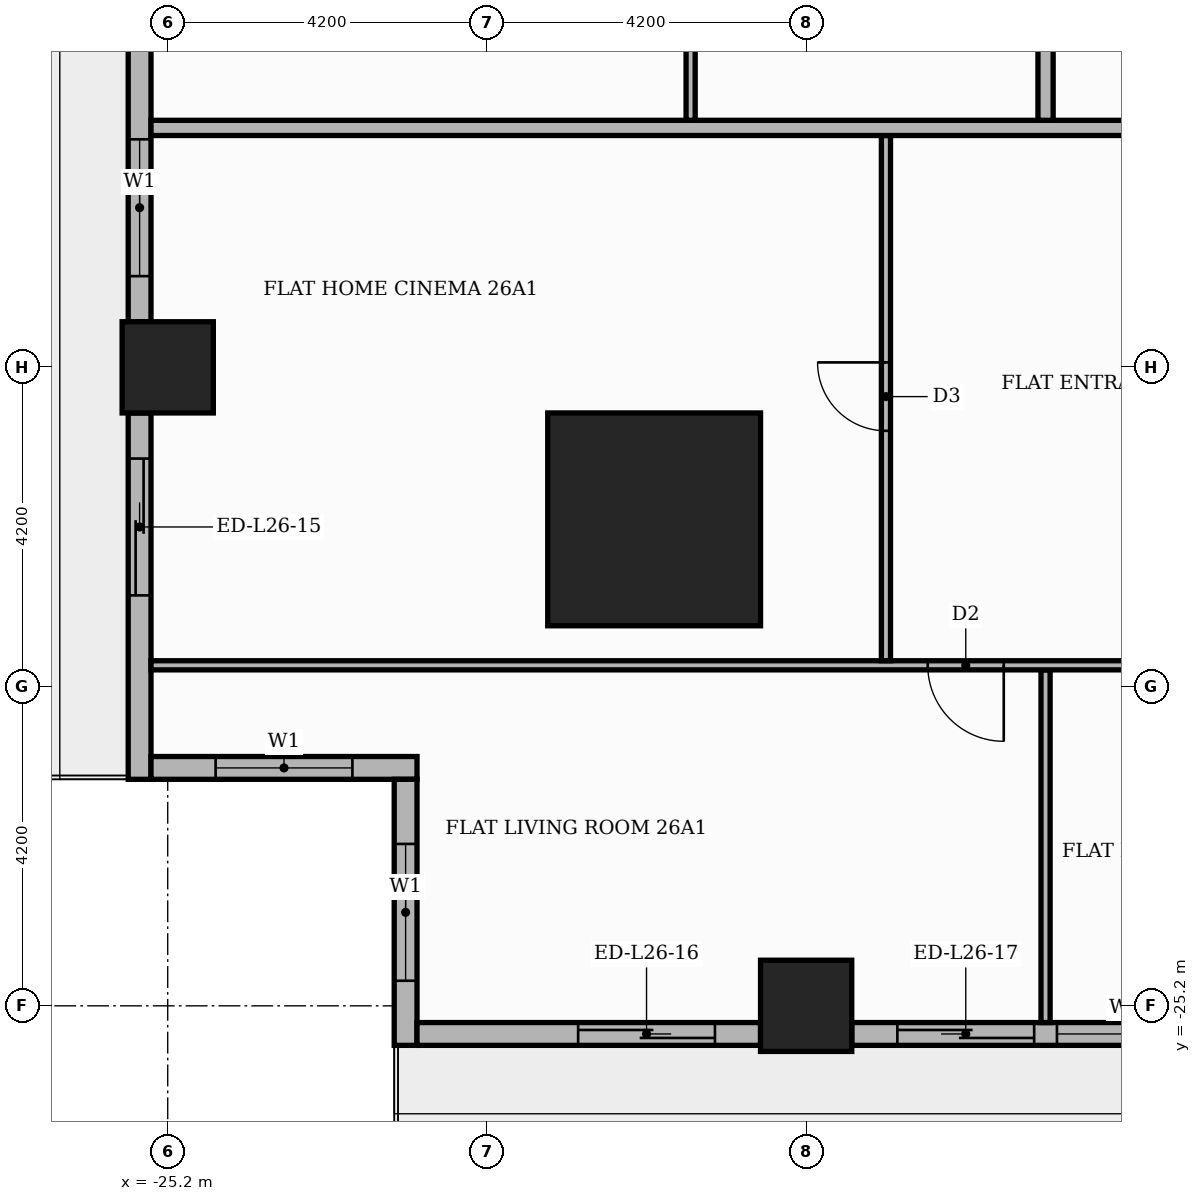
"""IFC4 building model, lengths in metres.
Left out: names, types, materials, properties, quantities, classifications, styles, units other than length and angle.
Written with IfcOpenShell. Run it as: python <this file> out.ifc"""

import sys

from ifc_helpers import new_model, si_unit, direction, frame, frame_2d, origin, origin_2d, place, context, subcontext, project, spatial, rectangle, extrude, element, fill, save


model = new_model("IFC4")
c1 = context("Model", 3, precision=1e-05, world=origin(), true_north=direction((0.0, 1.0)))
c2 = subcontext(c1, "Body", "Model", "MODEL_VIEW")
j1 = project(units=[si_unit("LENGTHUNIT", "METRE"), si_unit("PLANEANGLEUNIT", "RADIAN")], contexts=[c1])
p1 = place(None, origin())
s1 = spatial("IfcSite", under=j1, at=p1, CompositionType="ELEMENT")
p2 = place(p1, origin())
s2 = spatial("IfcBuilding", under=s1, at=p2, CompositionType="ELEMENT")
p3 = place(p2, frame((0.0, 0.0, 110.4)))
s3 = spatial("IfcBuildingStorey", under=s2, at=p3, CompositionType="ELEMENT", Elevation=110.4)
p4 = place(p3, frame((-18.8, -18.8, 0.0), z_axis=(0.0, 0.0, 1.0), x_axis=(1.0, 0.0, 0.0)))
e1 = element("IfcColumn", 1, at=p4, inside=s3, PredefinedType="COLUMN", context=c2, shape_type="SweptSolid", body=[
    extrude(rectangle(XDim=2.8, YDim=2.8, at=origin_2d()), origin(), (0.0, 0.0, 1.0), 3.9),
])
for number, where, z_axis, x_axis in (
    (2, (-16.8, -25.2, 0.0), (0.0, 0.0, 1.0), (1.0, 0.0, 0.0)),
    (3, (-25.2, -16.8, 0.0), (0.0, 0.0, 1.0), (1.0, 0.0, 0.0)),
):
    element("IfcColumn", number, at=place(p3, frame(where, z_axis=z_axis, x_axis=x_axis)), inside=s3, PredefinedType="COLUMN", context=c2, shape_type="SweptSolid", body=[
        extrude(rectangle(XDim=1.2, YDim=1.2, at=origin_2d()), origin(), (0.0, 0.0, 1.0), 3.9),
    ])
p5 = place(p3, frame((-25.57, -11.85, 0.0), z_axis=(0.0, 0.0, 1.0), x_axis=(0.0, -1.0, 0.0)))
e4 = element("IfcWall", 4, at=p5, inside=s3, PredefinedType="STANDARD", context=c2, shape_type="SweptSolid", body=[
    extrude(rectangle(XDim=4.35, YDim=0.3, at=frame_2d((2.175, 0.0))), origin(), (0.0, 0.0, 1.0), 3.48),
])
p6 = place(p5, frame((1.95, 0.0, 0.9)))
e5 = element("IfcOpeningElement", 5, at=p6, cuts=e4, PredefinedType="OPENING", context=c2, shape_type="SweptSolid", body=[
    extrude(rectangle(XDim=1.8, YDim=2.1, at=frame_2d((0.9, 1.05))), frame((0.0, 0.16, 0.0), z_axis=(0.0, -1.0, 0.0), x_axis=(1.0, 0.0, 0.0)), (0.0, 0.0, 1.0), 0.32),
])
p7 = place(p3, frame((-25.57, -17.4, 0.0), z_axis=(0.0, 0.0, 1.0), x_axis=(0.0, -1.0, 0.0)))
e6 = element("IfcWall", 6, at=p7, inside=s3, PredefinedType="STANDARD", context=c2, shape_type="SweptSolid", body=[
    extrude(rectangle(XDim=4.82, YDim=0.3, at=frame_2d((2.41, 0.0))), origin(), (0.0, 0.0, 1.0), 3.48),
])
p8 = place(p7, frame((0.6, 0.0, 0.0)))
e7 = element("IfcOpeningElement", 7, at=p8, cuts=e6, PredefinedType="OPENING", context=c2, shape_type="SweptSolid", body=[
    extrude(rectangle(XDim=1.8, YDim=2.4, at=frame_2d((0.9, 1.2))), frame((0.0, 0.16, 0.0), z_axis=(0.0, -1.0, 0.0), x_axis=(1.0, 0.0, 0.0)), (0.0, 0.0, 1.0), 0.32),
])
p9 = place(p3, frame((-25.42, -22.07, 0.0), z_axis=(0.0, 0.0, 1.0), x_axis=(1.0, 0.0, 0.0)))
e8 = element("IfcWall", 8, at=p9, inside=s3, PredefinedType="STANDARD", context=c2, shape_type="SweptSolid", body=[
    extrude(rectangle(XDim=3.5, YDim=0.3, at=frame_2d((1.75, 0.0))), origin(), (0.0, 0.0, 1.0), 3.48),
])
p10 = place(p9, frame((0.85, 0.0, 0.9)))
e9 = element("IfcOpeningElement", 9, at=p10, cuts=e8, PredefinedType="OPENING", context=c2, shape_type="SweptSolid", body=[
    extrude(rectangle(XDim=1.8, YDim=2.1, at=frame_2d((0.9, 1.05))), frame((0.0, 0.16, 0.0), z_axis=(0.0, -1.0, 0.0), x_axis=(1.0, 0.0, 0.0)), (0.0, 0.0, 1.0), 0.32),
])
p11 = place(p3, frame((-22.07, -22.22, 0.0), z_axis=(0.0, 0.0, 1.0), x_axis=(0.0, -1.0, 0.0)))
e10 = element("IfcWall", 10, at=p11, inside=s3, PredefinedType="STANDARD", context=c2, shape_type="SweptSolid", body=[
    extrude(rectangle(XDim=3.5, YDim=0.3, at=frame_2d((1.75, 0.0))), origin(), (0.0, 0.0, 1.0), 3.48),
])
p12 = place(p11, frame((0.85, 0.0, 0.9)))
e11 = element("IfcOpeningElement", 11, at=p12, cuts=e10, PredefinedType="OPENING", context=c2, shape_type="SweptSolid", body=[
    extrude(rectangle(XDim=1.8, YDim=2.1, at=frame_2d((0.9, 1.05))), frame((0.0, 0.16, 0.0), z_axis=(0.0, -1.0, 0.0), x_axis=(1.0, 0.0, 0.0)), (0.0, 0.0, 1.0), 0.32),
])
p13 = place(p3, frame((-21.92, -25.57, 0.0), z_axis=(0.0, 0.0, 1.0), x_axis=(1.0, 0.0, 0.0)))
e12 = element("IfcWall", 12, at=p13, inside=s3, PredefinedType="STANDARD", context=c2, shape_type="SweptSolid", body=[
    extrude(rectangle(XDim=4.52, YDim=0.3, at=frame_2d((2.26, 0.0))), origin(), (0.0, 0.0, 1.0), 3.48),
])
p14 = place(p13, frame((2.12, 0.0, 0.0)))
e13 = element("IfcOpeningElement", 13, at=p14, cuts=e12, PredefinedType="OPENING", context=c2, shape_type="SweptSolid", body=[
    extrude(rectangle(XDim=1.8, YDim=2.4, at=frame_2d((0.9, 1.2))), frame((0.0, 0.16, 0.0), z_axis=(0.0, -1.0, 0.0), x_axis=(1.0, 0.0, 0.0)), (0.0, 0.0, 1.0), 0.32),
])
p15 = place(p3, frame((-16.2, -25.57, 0.0), z_axis=(0.0, 0.0, 1.0), x_axis=(1.0, 0.0, 0.0)))
e14 = element("IfcWall", 14, at=p15, inside=s3, PredefinedType="STANDARD", context=c2, shape_type="SweptSolid", body=[
    extrude(rectangle(XDim=7.2, YDim=0.3, at=frame_2d((3.6, 0.0))), origin(), (0.0, 0.0, 1.0), 3.48),
])
p16 = place(p15, frame((0.6, 0.0, 0.0)))
e15 = element("IfcOpeningElement", 15, at=p16, cuts=e14, PredefinedType="OPENING", context=c2, shape_type="SweptSolid", body=[
    extrude(rectangle(XDim=1.8, YDim=2.4, at=frame_2d((0.9, 1.2))), frame((0.0, 0.16, 0.0), z_axis=(0.0, -1.0, 0.0), x_axis=(1.0, 0.0, 0.0)), (0.0, 0.0, 1.0), 0.32),
])
p17 = place(p15, frame((2.7, 0.0, 0.9)))
e16 = element("IfcOpeningElement", 16, at=p17, cuts=e14, PredefinedType="OPENING", context=c2, shape_type="SweptSolid", body=[
    extrude(rectangle(XDim=1.8, YDim=2.1, at=frame_2d((0.9, 1.05))), frame((0.0, 0.16, 0.0), z_axis=(0.0, -1.0, 0.0), x_axis=(1.0, 0.0, 0.0)), (0.0, 0.0, 1.0), 0.32),
])
p18 = place(p15, frame((4.8, 0.0, 0.0)))
e17 = element("IfcOpeningElement", 17, at=p18, cuts=e14, PredefinedType="OPENING", context=c2, shape_type="SweptSolid", body=[
    extrude(rectangle(XDim=1.8, YDim=2.4, at=frame_2d((0.9, 1.2))), frame((0.0, 0.16, 0.0), z_axis=(0.0, -1.0, 0.0), x_axis=(1.0, 0.0, 0.0)), (0.0, 0.0, 1.0), 0.32),
])
p19 = place(p3, frame((-13.65, -25.42, 0.0), z_axis=(0.0, 0.0, 1.0), x_axis=(0.0, 1.0, 0.0)))
e18 = element("IfcWall", 18, at=p19, inside=s3, PredefinedType="PARTITIONING", context=c2, shape_type="SweptSolid", body=[
    extrude(rectangle(XDim=4.64, YDim=0.12, at=frame_2d((2.32, 0.0))), origin(), (0.0, 0.0, 1.0), 3.48),
])
p20 = place(p3, frame((-25.42, -20.72, 0.0), z_axis=(0.0, 0.0, 1.0), x_axis=(1.0, 0.0, 0.0)))
e19 = element("IfcWall", 19, at=p20, inside=s3, PredefinedType="PARTITIONING", context=c2, shape_type="SweptSolid", body=[
    extrude(rectangle(XDim=38.97, YDim=0.12, at=frame_2d((19.485, 0.0))), origin(), (0.0, 0.0, 1.0), 3.48),
])
p21 = place(p20, frame((10.22, 0.0, 0.0)))
e20 = element("IfcOpeningElement", 20, at=p21, cuts=e19, PredefinedType="OPENING", context=c2, shape_type="SweptSolid", body=[
    extrude(rectangle(XDim=1.0, YDim=2.1, at=frame_2d((0.5, 1.05))), frame((0.0, 0.07, 0.0), z_axis=(0.0, -1.0, 0.0), x_axis=(1.0, 0.0, 0.0)), (0.0, 0.0, 1.0), 0.14),
])
p22 = place(p20, frame((14.47, 0.0, 0.0)))
e21 = element("IfcOpeningElement", 21, at=p22, cuts=e19, PredefinedType="OPENING", context=c2, shape_type="SweptSolid", body=[
    extrude(rectangle(XDim=0.9, YDim=2.1, at=frame_2d((0.45, 1.05))), frame((0.0, 0.07, 0.0), z_axis=(0.0, -1.0, 0.0), x_axis=(1.0, 0.0, 0.0)), (0.0, 0.0, 1.0), 0.14),
])
p23 = place(p20, frame((23.92, 0.0, 0.0)))
e22 = element("IfcOpeningElement", 22, at=p23, cuts=e19, PredefinedType="OPENING", context=c2, shape_type="SweptSolid", body=[
    extrude(rectangle(XDim=0.9, YDim=2.1, at=frame_2d((0.45, 1.05))), frame((0.0, 0.07, 0.0), z_axis=(0.0, -1.0, 0.0), x_axis=(1.0, 0.0, 0.0)), (0.0, 0.0, 1.0), 0.14),
])
p24 = place(p20, frame((28.12, 0.0, 0.0)))
e23 = element("IfcOpeningElement", 23, at=p24, cuts=e19, PredefinedType="OPENING", context=c2, shape_type="SweptSolid", body=[
    extrude(rectangle(XDim=0.9, YDim=2.1, at=frame_2d((0.45, 1.05))), frame((0.0, 0.07, 0.0), z_axis=(0.0, -1.0, 0.0), x_axis=(1.0, 0.0, 0.0)), (0.0, 0.0, 1.0), 0.14),
])
p25 = place(p20, frame((34.42, 0.0, 0.0)))
e24 = element("IfcOpeningElement", 24, at=p25, cuts=e19, PredefinedType="OPENING", context=c2, shape_type="SweptSolid", body=[
    extrude(rectangle(XDim=0.9, YDim=2.1, at=frame_2d((0.45, 1.05))), frame((0.0, 0.07, 0.0), z_axis=(0.0, -1.0, 0.0), x_axis=(1.0, 0.0, 0.0)), (0.0, 0.0, 1.0), 0.14),
])
p26 = place(p3, frame((-15.75, -20.66, 0.0), z_axis=(0.0, 0.0, 1.0), x_axis=(0.0, 1.0, 0.0)))
e25 = element("IfcWall", 25, at=p26, inside=s3, PredefinedType="PARTITIONING", context=c2, shape_type="SweptSolid", body=[
    extrude(rectangle(XDim=6.91, YDim=0.12, at=frame_2d((3.455, 0.0))), origin(), (0.0, 0.0, 1.0), 3.48),
])
p27 = place(p26, frame((3.025, 0.0, 0.0)))
e26 = element("IfcOpeningElement", 26, at=p27, cuts=e25, PredefinedType="OPENING", context=c2, shape_type="SweptSolid", body=[
    extrude(rectangle(XDim=0.9, YDim=2.1, at=frame_2d((0.45, 1.05))), frame((0.0, 0.07, 0.0), z_axis=(0.0, -1.0, 0.0), x_axis=(1.0, 0.0, 0.0)), (0.0, 0.0, 1.0), 0.14),
])
p28 = place(p3, frame((-25.42, -13.65, 0.0), z_axis=(0.0, 0.0, 1.0), x_axis=(1.0, 0.0, 0.0)))
e27 = element("IfcWall", 27, at=p28, inside=s3, PredefinedType="PARTITIONING", context=c2, shape_type="SweptSolid", body=[
    extrude(rectangle(XDim=39.07, YDim=0.2, at=frame_2d((19.535, 0.0))), origin(), (0.0, 0.0, 1.0), 3.48),
])
p29 = place(p28, frame((13.32, 0.0, 0.0)))
e28 = element("IfcOpeningElement", 28, at=p29, cuts=e27, PredefinedType="OPENING", context=c2, shape_type="SweptSolid", body=[
    extrude(rectangle(XDim=1.1, YDim=2.4, at=frame_2d((0.55, 1.2))), frame((0.0, 0.11, 0.0), z_axis=(0.0, -1.0, 0.0), x_axis=(1.0, 0.0, 0.0)), (0.0, 0.0, 1.0), 0.22),
])
p30 = place(p3, frame((-18.32, -13.55, 0.0), z_axis=(0.0, 0.0, 1.0), x_axis=(0.0, 1.0, 0.0)))
e29 = element("IfcWall", 29, at=p30, inside=s3, PredefinedType="PARTITIONING", context=c2, shape_type="SweptSolid", body=[
    extrude(rectangle(XDim=4.04, YDim=0.12, at=frame_2d((2.02, 0.0))), origin(), (0.0, 0.0, 1.0), 3.48),
])
p31 = place(p30, frame((1.55, 0.0, 0.0)))
e30 = element("IfcOpeningElement", 30, at=p31, cuts=e29, PredefinedType="OPENING", context=c2, shape_type="SweptSolid", body=[
    extrude(rectangle(XDim=0.9, YDim=2.1, at=frame_2d((0.45, 1.05))), frame((0.0, 0.07, 0.0), z_axis=(0.0, -1.0, 0.0), x_axis=(1.0, 0.0, 0.0)), (0.0, 0.0, 1.0), 0.14),
])
p32 = place(p3, frame((-13.65, -13.55, 0.0), z_axis=(0.0, 0.0, 1.0), x_axis=(0.0, 1.0, 0.0)))
e31 = element("IfcWall", 31, at=p32, inside=s3, PredefinedType="PARTITIONING", context=c2, shape_type="SweptSolid", body=[
    extrude(rectangle(XDim=18.7, YDim=0.2, at=frame_2d((9.35, 0.0))), origin(), (0.0, 0.0, 1.0), 3.48),
])
p33 = place(p32, frame((14.05, 0.0, 0.0)))
e32 = element("IfcOpeningElement", 32, at=p33, cuts=e31, PredefinedType="OPENING", context=c2, shape_type="SweptSolid", body=[
    extrude(rectangle(XDim=1.1, YDim=2.4, at=frame_2d((0.55, 1.2))), frame((0.0, 0.11, 0.0), z_axis=(0.0, -1.0, 0.0), x_axis=(1.0, 0.0, 0.0)), (0.0, 0.0, 1.0), 0.22),
])
p34 = place(p6, origin())
e33 = element("IfcWindow", 33, at=p34, inside=s3, PartitioningType="SINGLE_PANEL", PredefinedType="WINDOW", context=c2, shape_type="SweptSolid", body=[
    extrude(rectangle(XDim=1.8, YDim=2.1, at=frame_2d((0.9, 1.05))), frame((0.0, 0.03, 0.0), z_axis=(0.0, -1.0, 0.0), x_axis=(1.0, 0.0, 0.0)), (0.0, 0.0, 1.0), 0.06),
])
fill(e5, e33)
p35 = place(p8, origin())
e34 = element("IfcDoor", 34, at=p35, inside=s3, OperationType="SLIDING_TO_LEFT", PredefinedType="DOOR", context=c2, shape_type="SweptSolid", body=[
    extrude(rectangle(XDim=1.8, YDim=2.4, at=frame_2d((0.9, 1.2))), frame((0.0, 0.025, 0.0), z_axis=(0.0, -1.0, 0.0), x_axis=(1.0, 0.0, 0.0)), (0.0, 0.0, 1.0), 0.05),
])
fill(e7, e34)
p36 = place(p10, origin())
e35 = element("IfcWindow", 35, at=p36, inside=s3, PartitioningType="SINGLE_PANEL", PredefinedType="WINDOW", context=c2, shape_type="SweptSolid", body=[
    extrude(rectangle(XDim=1.8, YDim=2.1, at=frame_2d((0.9, 1.05))), frame((0.0, 0.03, 0.0), z_axis=(0.0, -1.0, 0.0), x_axis=(1.0, 0.0, 0.0)), (0.0, 0.0, 1.0), 0.06),
])
fill(e9, e35)
p37 = place(p12, origin())
e36 = element("IfcWindow", 36, at=p37, inside=s3, PartitioningType="SINGLE_PANEL", PredefinedType="WINDOW", context=c2, shape_type="SweptSolid", body=[
    extrude(rectangle(XDim=1.8, YDim=2.1, at=frame_2d((0.9, 1.05))), frame((0.0, 0.03, 0.0), z_axis=(0.0, -1.0, 0.0), x_axis=(1.0, 0.0, 0.0)), (0.0, 0.0, 1.0), 0.06),
])
fill(e11, e36)
p38 = place(p14, origin())
e37 = element("IfcDoor", 37, at=p38, inside=s3, OperationType="SLIDING_TO_RIGHT", PredefinedType="DOOR", context=c2, shape_type="SweptSolid", body=[
    extrude(rectangle(XDim=1.8, YDim=2.4, at=frame_2d((0.9, 1.2))), frame((0.0, 0.025, 0.0), z_axis=(0.0, -1.0, 0.0), x_axis=(1.0, 0.0, 0.0)), (0.0, 0.0, 1.0), 0.05),
])
fill(e13, e37)
p39 = place(p16, origin())
e38 = element("IfcDoor", 38, at=p39, inside=s3, OperationType="SLIDING_TO_LEFT", PredefinedType="DOOR", context=c2, shape_type="SweptSolid", body=[
    extrude(rectangle(XDim=1.8, YDim=2.4, at=frame_2d((0.9, 1.2))), frame((0.0, 0.025, 0.0), z_axis=(0.0, -1.0, 0.0), x_axis=(1.0, 0.0, 0.0)), (0.0, 0.0, 1.0), 0.05),
])
fill(e15, e38)
p40 = place(p17, origin())
e39 = element("IfcWindow", 39, at=p40, inside=s3, PartitioningType="SINGLE_PANEL", PredefinedType="WINDOW", context=c2, shape_type="SweptSolid", body=[
    extrude(rectangle(XDim=1.8, YDim=2.1, at=frame_2d((0.9, 1.05))), frame((0.0, 0.03, 0.0), z_axis=(0.0, -1.0, 0.0), x_axis=(1.0, 0.0, 0.0)), (0.0, 0.0, 1.0), 0.06),
])
fill(e16, e39)
p41 = place(p27, origin())
e40 = element("IfcDoor", 40, at=p41, inside=s3, OperationType="SINGLE_SWING_RIGHT", PredefinedType="DOOR", context=c2, shape_type="SweptSolid", body=[
    extrude(rectangle(XDim=0.9, YDim=2.1, at=frame_2d((0.45, 1.05))), frame((0.0, 0.025, 0.0), z_axis=(0.0, -1.0, 0.0), x_axis=(1.0, 0.0, 0.0)), (0.0, 0.0, 1.0), 0.05),
])
fill(e26, e40)
p42 = place(p21, frame((1.0, 0.0, 0.0), z_axis=(0.0, 0.0, 1.0), x_axis=(-1.0, 0.0, 0.0)))
e41 = element("IfcDoor", 41, at=p42, inside=s3, OperationType="SINGLE_SWING_RIGHT", PredefinedType="DOOR", context=c2, shape_type="SweptSolid", body=[
    extrude(rectangle(XDim=1.0, YDim=2.1, at=frame_2d((0.5, 1.05))), frame((0.0, 0.025, 0.0), z_axis=(0.0, -1.0, 0.0), x_axis=(1.0, 0.0, 0.0)), (0.0, 0.0, 1.0), 0.05),
])
fill(e20, e41)
save(model, sys.argv[1])
